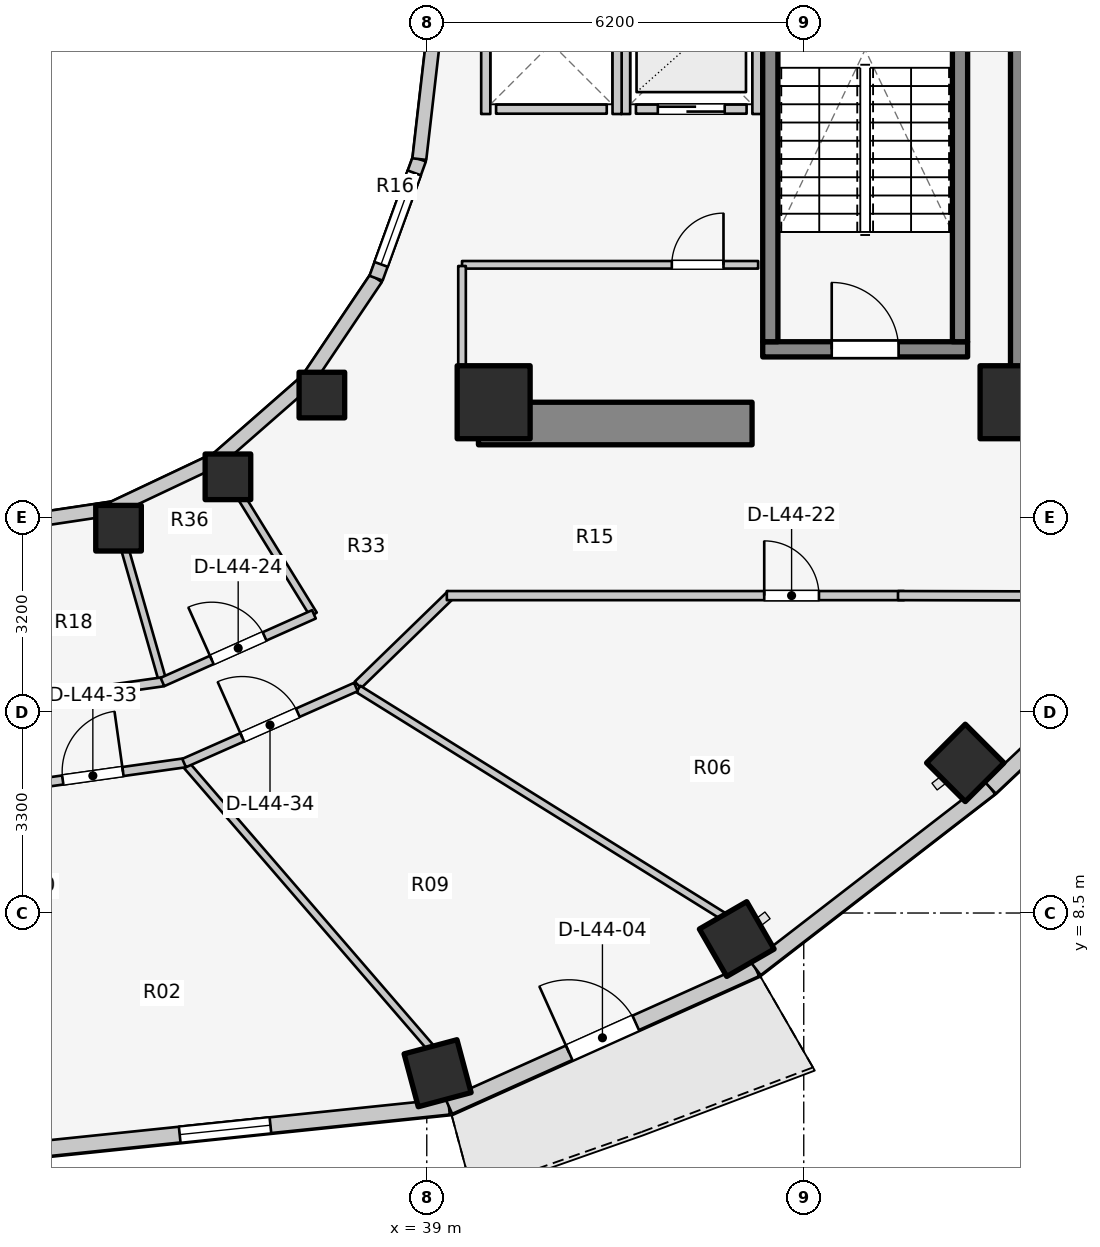
"""IFC4 building model, lengths in metres.
Left out: names, types, materials, properties, quantities, classifications, styles, units other than length and angle.
Written with IfcOpenShell. Run it as: python <this file> out.ifc"""

import sys

from ifc_helpers import new_model, si_unit, direction, frame, frame_2d, origin, origin_2d, place, context, subcontext, project, spatial, rectangle, extrude, element, fill, save


model = new_model("IFC4")
c1 = context("Model", 3, precision=1e-05, world=origin(), true_north=direction((0.0, 1.0)))
c2 = subcontext(c1, "Body", "Model", "MODEL_VIEW")
j1 = project(units=[si_unit("LENGTHUNIT", "METRE"), si_unit("PLANEANGLEUNIT", "RADIAN")], contexts=[c1])
p1 = place(None, origin())
s1 = spatial("IfcSite", under=j1, at=p1, CompositionType="ELEMENT")
p2 = place(p1, origin())
s2 = spatial("IfcBuilding", under=s1, at=p2, CompositionType="ELEMENT")
p3 = place(p2, frame((0.0, 0.0, 146.7)))
s3 = spatial("IfcBuildingStorey", under=s2, at=p3, CompositionType="ELEMENT", Elevation=146.7)
p4 = place(p3, frame((48.95, 17.05, 0.0), z_axis=(0.0, 0.0, 1.0), x_axis=(0.0, 1.0, 0.0)))
e1 = element("IfcWall", 1, at=p4, inside=s3, PredefinedType="SHEAR", context=c2, shape_type="SweptSolid", body=[
    extrude(rectangle(XDim=12.8, YDim=0.7, at=frame_2d((6.4, 0.0))), origin(), (0.0, 0.0, 1.0), 3.1),
])
p5 = place(p3, frame((39.85, 16.55, 0.0), z_axis=(0.0, 0.0, 1.0), x_axis=(1.0, 0.0, 0.0)))
e2 = element("IfcWall", 2, at=p5, inside=s3, PredefinedType="SHEAR", context=c2, shape_type="SweptSolid", body=[
    extrude(rectangle(XDim=4.5, YDim=0.7, at=frame_2d((2.25, 0.0))), origin(), (0.0, 0.0, 1.0), 3.1),
])
p6 = place(p3, frame((44.525, 17.77, 0.0), z_axis=(0.0, 0.0, 1.0), x_axis=(1.0, 0.0, 0.0)))
e3 = element("IfcWall", 3, at=p6, inside=s3, PredefinedType="SOLIDWALL", context=c2, shape_type="SweptSolid", body=[
    extrude(rectangle(XDim=3.37, YDim=0.25, at=frame_2d((1.685, 0.0))), origin(), (0.0, 0.0, 1.0), 3.1),
])
p7 = place(p6, frame((1.135, 0.0, 0.0)))
e4 = element("IfcOpeningElement", 4, at=p7, cuts=e3, PredefinedType="OPENING", context=c2, shape_type="SweptSolid", body=[
    extrude(rectangle(XDim=1.1, YDim=2.1, at=frame_2d((0.55, 1.05))), frame((0.0, 0.135, 0.0), z_axis=(0.0, -1.0, 0.0), x_axis=(1.0, 0.0, 0.0)), (0.0, 0.0, 1.0), 0.27),
])
for number, where, z_axis, x_axis in (
    (5, (44.65, 17.895, 0.0), (0.0, 0.0, 1.0), (0.0, 1.0, 0.0)),
    (6, (47.77, 17.895, 0.0), (0.0, 0.0, 1.0), (0.0, 1.0, 0.0)),
):
    element("IfcWall", number, at=place(p3, frame(where, z_axis=z_axis, x_axis=x_axis)), inside=s3, PredefinedType="SOLIDWALL", context=c2, shape_type="SweptSolid", body=[
        extrude(rectangle(XDim=7.81, YDim=0.25, at=frame_2d((3.905, 0.0))), origin(), (0.0, 0.0, 1.0), 3.1),
    ])
for number, where, z_axis, x_axis in (
    (7, (40.1, 16.9, 0.0), (0.0, 0.0, 1.0), (1.0, 0.0, 0.0)),
    (8, (48.7, 16.9, 0.0), (0.0, 0.0, 1.0), (1.0, 0.0, 0.0)),
):
    element("IfcColumn", number, at=place(p3, frame(where, z_axis=z_axis, x_axis=x_axis)), inside=s3, PredefinedType="COLUMN", context=c2, shape_type="SweptSolid", body=[
        extrude(rectangle(XDim=1.2, YDim=1.2, at=origin_2d()), origin(), (0.0, 0.0, 1.0), 3.1),
    ])
p8 = place(p3, frame((33.931, 14.828, 0.0), z_axis=(0.0, 0.0, 1.0), x_axis=(1.0, 0.0, 0.0)))
e9 = element("IfcColumn", 9, at=p8, inside=s3, PredefinedType="COLUMN", context=c2, shape_type="SweptSolid", body=[
    extrude(rectangle(XDim=0.75, YDim=0.75, at=origin_2d()), origin(), (0.0, 0.0, 1.0), 3.1),
])
p9 = place(p3, frame((39.178, 5.865, 0.0), z_axis=(0.0, 0.0, 1.0), x_axis=(0.258819045103, -0.965925826289, 0.0)))
e10 = element("IfcColumn", 10, at=p9, inside=s3, PredefinedType="COLUMN", context=c2, shape_type="SweptSolid", body=[
    extrude(rectangle(XDim=0.9, YDim=0.9, at=origin_2d()), origin(), (0.0, 0.0, 1.0), 3.1),
])
p10 = place(p3, frame((35.73, 15.673, 0.0), z_axis=(0.0, 0.0, 1.0), x_axis=(1.0, 0.0, 0.0)))
e11 = element("IfcColumn", 11, at=p10, inside=s3, PredefinedType="COLUMN", context=c2, shape_type="SweptSolid", body=[
    extrude(rectangle(XDim=0.75, YDim=0.75, at=origin_2d()), origin(), (0.0, 0.0, 1.0), 3.1),
])
p11 = place(p3, frame((44.098, 8.072, 0.0), z_axis=(0.0, 0.0, 1.0), x_axis=(0.5, -0.866025403784, 0.0)))
e12 = element("IfcColumn", 12, at=p11, inside=s3, PredefinedType="COLUMN", context=c2, shape_type="SweptSolid", body=[
    extrude(rectangle(XDim=0.9, YDim=0.9, at=origin_2d()), origin(), (0.0, 0.0, 1.0), 3.1),
])
p12 = place(p3, frame((37.275, 17.018, 0.0), z_axis=(0.0, 0.0, 1.0), x_axis=(1.0, 0.0, 0.0)))
e13 = element("IfcColumn", 13, at=p12, inside=s3, PredefinedType="COLUMN", context=c2, shape_type="SweptSolid", body=[
    extrude(rectangle(XDim=0.75, YDim=0.75, at=origin_2d()), origin(), (0.0, 0.0, 1.0), 3.1),
])
p13 = place(p3, frame((47.857, 10.969, 0.0), z_axis=(0.0, 0.0, 1.0), x_axis=(0.707106781187, -0.707106781187, 0.0)))
e14 = element("IfcColumn", 14, at=p13, inside=s3, PredefinedType="COLUMN", context=c2, shape_type="SweptSolid", body=[
    extrude(rectangle(XDim=0.9, YDim=0.9, at=origin_2d()), origin(), (0.0, 0.0, 1.0), 3.1),
])
p14 = place(p3, frame((32.0, 14.88, 0.0), z_axis=(0.0, 0.0, 1.0), x_axis=(0.988901730308, 0.148571086668, 0.0)))
e15 = element("IfcWall", 15, at=p14, inside=s3, PredefinedType="STANDARD", context=c2, shape_type="SweptSolid", body=[
    extrude(rectangle(XDim=1.864, YDim=0.23, at=frame_2d((0.932, 0.0))), origin(), (0.0, 0.0, 1.0), 2.16),
])
p15 = place(p3, frame((33.843, 15.157, 0.0), z_axis=(0.0, 0.0, 1.0), x_axis=(0.904179699603, 0.427152280606, 0.0)))
e16 = element("IfcWall", 16, at=p15, inside=s3, PredefinedType="STANDARD", context=c2, shape_type="SweptSolid", body=[
    extrude(rectangle(XDim=1.899, YDim=0.23, at=frame_2d((0.95, 0.0))), origin(), (0.0, 0.0, 1.0), 2.16),
])
p16 = place(p3, frame((35.56, 15.968, 0.0), z_axis=(0.0, 0.0, 1.0), x_axis=(0.752576694707, 0.658504607869, 0.0)))
e17 = element("IfcWall", 17, at=p16, inside=s3, PredefinedType="STANDARD", context=c2, shape_type="SweptSolid", body=[
    extrude(rectangle(XDim=1.959, YDim=0.23, at=frame_2d((0.98, 0.0))), origin(), (0.0, 0.0, 1.0), 2.16),
])
p17 = place(p3, frame((37.035, 17.258, 0.0), z_axis=(0.0, 0.0, 1.0), x_axis=(0.558197800898, 0.829707909492, 0.0)))
e18 = element("IfcWall", 18, at=p17, inside=s3, PredefinedType="STANDARD", context=c2, shape_type="SweptSolid", body=[
    extrude(rectangle(XDim=2.027, YDim=0.23, at=frame_2d((1.013, 0.0))), origin(), (0.0, 0.0, 1.0), 2.16),
])
p18 = place(p3, frame((38.166, 18.94, 0.0), z_axis=(0.0, 0.0, 1.0), x_axis=(0.341423187295, 0.93990968033, 0.0)))
e19 = element("IfcWall", 19, at=p18, inside=s3, PredefinedType="STANDARD", context=c2, shape_type="SweptSolid", body=[
    extrude(rectangle(XDim=2.084, YDim=0.23, at=frame_2d((1.042, 0.0))), origin(), (0.0, 0.0, 1.0), 2.84),
])
p19 = place(p18, frame((0.242, 0.0, 0.85)))
e20 = element("IfcOpeningElement", 20, at=p19, cuts=e19, PredefinedType="OPENING", context=c2, shape_type="SweptSolid", body=[
    extrude(rectangle(XDim=1.6, YDim=1.65, at=frame_2d((0.8, 0.825))), frame((0.0, 0.125, 0.0), z_axis=(0.0, -1.0, 0.0), x_axis=(1.0, 0.0, 0.0)), (0.0, 0.0, 1.0), 0.25),
])
p20 = place(p3, frame((38.877, 20.898, 0.0), z_axis=(0.0, 0.0, 1.0), x_axis=(0.114711713601, 0.993398823617, 0.0)))
e21 = element("IfcWall", 21, at=p20, inside=s3, PredefinedType="STANDARD", context=c2, shape_type="SweptSolid", body=[
    extrude(rectangle(XDim=2.115, YDim=0.23, at=frame_2d((1.058, 0.0))), origin(), (0.0, 0.0, 1.0), 2.84),
])
p21 = place(p3, frame((32.0, 4.552, 0.0), z_axis=(0.0, 0.0, 1.0), x_axis=(0.994664178965, 0.10316574569, 0.0)))
e22 = element("IfcWall", 22, at=p21, inside=s3, PredefinedType="STANDARD", context=c2, shape_type="SweptSolid", body=[
    extrude(rectangle(XDim=7.405, YDim=0.26, at=frame_2d((3.702, 0.0))), origin(), (0.0, 0.0, 1.0), 2.85),
])
p22 = place(p21, frame((2.952, 0.0, 0.75)))
e23 = element("IfcOpeningElement", 23, at=p22, cuts=e22, PredefinedType="OPENING", context=c2, shape_type="SweptSolid", body=[
    extrude(rectangle(XDim=1.5, YDim=1.6, at=frame_2d((0.75, 0.8))), frame((0.0, 0.14, 0.0), z_axis=(0.0, -1.0, 0.0), x_axis=(1.0, 0.0, 0.0)), (0.0, 0.0, 1.0), 0.28),
])
p23 = place(p3, frame((39.365, 5.315, 0.0), z_axis=(0.0, 0.0, 1.0), x_axis=(0.912353637112, 0.409403029847, 0.0)))
e24 = element("IfcWall", 24, at=p23, inside=s3, PredefinedType="STANDARD", context=c2, shape_type="SweptSolid", body=[
    extrude(rectangle(XDim=5.533, YDim=0.26, at=frame_2d((2.766, 0.0))), origin(), (0.0, 0.0, 1.0), 2.88),
])
p24 = place(p23, frame((2.167, 0.0, 0.0)))
e25 = element("IfcOpeningElement", 25, at=p24, cuts=e24, PredefinedType="OPENING", context=c2, shape_type="SweptSolid", body=[
    extrude(rectangle(XDim=1.2, YDim=2.2, at=frame_2d((0.6, 1.1))), frame((0.0, 0.14, 0.0), z_axis=(0.0, -1.0, 0.0), x_axis=(1.0, 0.0, 0.0)), (0.0, 0.0, 1.0), 0.28),
])
p25 = place(p3, frame((44.413, 7.581, 0.0), z_axis=(0.0, 0.0, 1.0), x_axis=(0.791460185804, 0.611220724687, 0.0)))
e26 = element("IfcWall", 26, at=p25, inside=s3, PredefinedType="STANDARD", context=c2, shape_type="SweptSolid", body=[
    extrude(rectangle(XDim=4.872, YDim=0.26, at=frame_2d((2.436, 0.0))), origin(), (0.0, 0.0, 1.0), 2.85),
])
p26 = place(p3, frame((48.269, 10.559, 0.0), z_axis=(0.0, 0.0, 1.0), x_axis=(0.727667301037, 0.68593024354, 0.0)))
e27 = element("IfcWall", 27, at=p26, inside=s3, PredefinedType="STANDARD", context=c2, shape_type="SweptSolid", body=[
    extrude(rectangle(XDim=4.604, YDim=0.26, at=frame_2d((2.302, 0.0))), origin(), (0.0, 0.0, 1.0), 2.85),
])
p27 = place(p26, frame((1.552, 0.0, 0.75)))
e28 = element("IfcOpeningElement", 28, at=p27, cuts=e27, PredefinedType="OPENING", context=c2, shape_type="SweptSolid", body=[
    extrude(rectangle(XDim=1.5, YDim=1.6, at=frame_2d((0.75, 0.8))), frame((0.0, 0.14, 0.0), z_axis=(0.0, -1.0, 0.0), x_axis=(1.0, 0.0, 0.0)), (0.0, 0.0, 1.0), 0.28),
])
p28 = place(p3, frame((42.44, 21.72, 0.0), z_axis=(0.0, 0.0, 1.0), x_axis=(1.0, 0.0, 0.0)))
e29 = element("IfcWall", 29, at=p28, inside=s3, PredefinedType="SOLIDWALL", context=c2, shape_type="SweptSolid", body=[
    extrude(rectangle(XDim=1.82, YDim=0.15, at=frame_2d((0.91, 0.0))), origin(), (0.0, 0.0, 1.0), 2.855),
])
p29 = place(p28, frame((0.36, 0.0, 0.0)))
e30 = element("IfcOpeningElement", 30, at=p29, cuts=e29, PredefinedType="OPENING", context=c2, shape_type="SweptSolid", body=[
    extrude(rectangle(XDim=1.1, YDim=2.1, at=frame_2d((0.55, 1.05))), frame((0.0, 0.085, 0.0), z_axis=(0.0, -1.0, 0.0), x_axis=(1.0, 0.0, 0.0)), (0.0, 0.0, 1.0), 0.17),
])
for number, where, z_axis, x_axis in (
    (31, (42.27, 21.64, 0.0), (0.0, 0.0, 1.0), (0.0, 1.0, 0.0)),
    (32, (44.43, 21.64, 0.0), (0.0, 0.0, 1.0), (0.0, 1.0, 0.0)),
):
    element("IfcWall", number, at=place(p3, frame(where, z_axis=z_axis, x_axis=x_axis)), inside=s3, PredefinedType="SOLIDWALL", context=c2, shape_type="SweptSolid", body=[
        extrude(rectangle(XDim=2.32, YDim=0.15, at=frame_2d((1.16, 0.0))), origin(), (0.0, 0.0, 1.0), 2.855),
    ])
p30 = place(p3, frame((40.14, 21.72, 0.0), z_axis=(0.0, 0.0, 1.0), x_axis=(1.0, 0.0, 0.0)))
e33 = element("IfcWall", 33, at=p30, inside=s3, PredefinedType="SOLIDWALL", context=c2, shape_type="SweptSolid", body=[
    extrude(rectangle(XDim=1.82, YDim=0.15, at=frame_2d((0.91, 0.0))), origin(), (0.0, 0.0, 1.0), 2.12),
])
p31 = place(p3, frame((39.97, 21.64, 0.0), z_axis=(0.0, 0.0, 1.0), x_axis=(0.0, 1.0, 0.0)))
e34 = element("IfcWall", 34, at=p31, inside=s3, PredefinedType="SOLIDWALL", context=c2, shape_type="SweptSolid", body=[
    extrude(rectangle(XDim=2.32, YDim=0.15, at=frame_2d((1.16, 0.0))), origin(), (0.0, 0.0, 1.0), 2.12),
])
p32 = place(p3, frame((42.13, 21.64, 0.0), z_axis=(0.0, 0.0, 1.0), x_axis=(0.0, 1.0, 0.0)))
e35 = element("IfcWall", 35, at=p32, inside=s3, PredefinedType="SOLIDWALL", context=c2, shape_type="SweptSolid", body=[
    extrude(rectangle(XDim=2.32, YDim=0.15, at=frame_2d((1.16, 0.0))), origin(), (0.0, 0.0, 1.0), 2.855),
])
p33 = place(p3, frame((39.58, 19.16, 0.0), z_axis=(0.0, 0.0, 1.0), x_axis=(1.0, 0.0, 0.0)))
e36 = element("IfcWall", 36, at=p33, inside=s3, PredefinedType="PARTITIONING", context=c2, shape_type="SweptSolid", body=[
    extrude(rectangle(XDim=4.87, YDim=0.125, at=frame_2d((2.435, 0.0))), origin(), (0.0, 0.0, 1.0), 2.12),
])
p34 = place(p33, frame((3.45, 0.0, 0.0)))
e37 = element("IfcOpeningElement", 37, at=p34, cuts=e36, PredefinedType="OPENING", context=c2, shape_type="SweptSolid", body=[
    extrude(rectangle(XDim=0.85, YDim=2.05, at=frame_2d((0.425, 1.025))), frame((0.0, 0.073, 0.0), z_axis=(0.0, -1.0, 0.0), x_axis=(1.0, 0.0, 0.0)), (0.0, 0.0, 1.0), 0.145),
])
p35 = place(p3, frame((39.58, 17.1, 0.0), z_axis=(0.0, 0.0, 1.0), x_axis=(0.0, 1.0, 0.0)))
e38 = element("IfcWall", 38, at=p35, inside=s3, PredefinedType="PARTITIONING", context=c2, shape_type="SweptSolid", body=[
    extrude(rectangle(XDim=2.04, YDim=0.125, at=frame_2d((1.02, 0.0))), origin(), (0.0, 0.0, 1.0), 2.232),
])
p36 = place(p3, frame((37.867, 12.251, 0.0), z_axis=(0.0, 0.0, 1.0), x_axis=(0.717419568599, 0.696641344302, 0.0)))
e39 = element("IfcWall", 39, at=p36, inside=s3, PredefinedType="PARTITIONING", context=c2, shape_type="SweptSolid", body=[
    extrude(rectangle(XDim=2.138, YDim=0.15, at=frame_2d((1.069, 0.0))), origin(), (0.0, 0.0, 1.0), 2.299),
])
p37 = place(p3, frame((39.33, 13.72, 0.0), z_axis=(0.0, 0.0, 1.0), x_axis=(1.0, 0.0, 0.0)))
e40 = element("IfcWall", 40, at=p37, inside=s3, PredefinedType="PARTITIONING", context=c2, shape_type="SweptSolid", body=[
    extrude(rectangle(XDim=7.52, YDim=0.15, at=frame_2d((3.76, 0.0))), origin(), (0.0, 0.0, 1.0), 2.299),
])
p38 = place(p37, frame((5.22, 0.0, 0.0)))
e41 = element("IfcOpeningElement", 41, at=p38, cuts=e40, PredefinedType="OPENING", context=c2, shape_type="SweptSolid", body=[
    extrude(rectangle(XDim=0.9, YDim=2.1, at=frame_2d((0.45, 1.05))), frame((0.0, 0.085, 0.0), z_axis=(0.0, -1.0, 0.0), x_axis=(1.0, 0.0, 0.0)), (0.0, 0.0, 1.0), 0.17),
])
p39 = place(p3, frame((46.75, 13.72, 0.0), z_axis=(0.0, 0.0, 1.0), x_axis=(0.999997122315, -0.00239903348, 0.0)))
e42 = element("IfcWall", 42, at=p39, inside=s3, PredefinedType="PARTITIONING", context=c2, shape_type="SweptSolid", body=[
    extrude(rectangle(XDim=4.885, YDim=0.15, at=frame_2d((2.442, 0.0))), origin(), (0.0, 0.0, 1.0), 2.22),
])
p40 = place(p3, frame((33.838, 15.176, 0.0), z_axis=(0.0, 0.0, 1.0), x_axis=(0.274947609893, -0.961459209647, 0.0)))
e43 = element("IfcWall", 43, at=p40, inside=s3, PredefinedType="PARTITIONING", context=c2, shape_type="SweptSolid", body=[
    extrude(rectangle(XDim=2.99, YDim=0.125, at=frame_2d((1.495, 0.0))), origin(), (0.0, 0.0, 1.0), 2.299),
])
p41 = place(p3, frame((35.55, 15.985, 0.0), z_axis=(0.0, 0.0, 1.0), x_axis=(0.524565340045, -0.851370192116, 0.0)))
e44 = element("IfcWall", 44, at=p41, inside=s3, PredefinedType="PARTITIONING", context=c2, shape_type="SweptSolid", body=[
    extrude(rectangle(XDim=3.027, YDim=0.125, at=frame_2d((1.514, 0.0))), origin(), (0.0, 0.0, 1.0), 2.299),
])
p42 = place(p3, frame((31.998, 11.924, 0.0), z_axis=(0.0, 0.0, 1.0), x_axis=(0.990041682628, 0.140774524184, 0.0)))
e45 = element("IfcWall", 45, at=p42, inside=s3, PredefinedType="PARTITIONING", context=c2, shape_type="SweptSolid", body=[
    extrude(rectangle(XDim=2.695, YDim=0.15, at=frame_2d((1.348, 0.0))), origin(), (0.0, 0.0, 1.0), 2.299),
])
p43 = place(p3, frame((34.653, 12.299, 0.0), z_axis=(0.0, 0.0, 1.0), x_axis=(0.913112902883, 0.407706789971, 0.0)))
e46 = element("IfcWall", 46, at=p43, inside=s3, PredefinedType="PARTITIONING", context=c2, shape_type="SweptSolid", body=[
    extrude(rectangle(XDim=2.729, YDim=0.15, at=frame_2d((1.364, 0.0))), origin(), (0.0, 0.0, 1.0), 2.299),
])
p44 = place(p43, frame((0.889, 0.0, 0.0)))
e47 = element("IfcOpeningElement", 47, at=p44, cuts=e46, PredefinedType="OPENING", context=c2, shape_type="SweptSolid", body=[
    extrude(rectangle(XDim=0.95, YDim=2.1, at=frame_2d((0.475, 1.05))), frame((0.0, 0.085, 0.0), z_axis=(0.0, -1.0, 0.0), x_axis=(1.0, 0.0, 0.0)), (0.0, 0.0, 1.0), 0.17),
])
p45 = place(p3, frame((35.053, 10.927, 0.0), z_axis=(0.0, 0.0, 1.0), x_axis=(0.653779283332, -0.756685303601, 0.0)))
e48 = element("IfcWall", 48, at=p45, inside=s3, PredefinedType="PARTITIONING", context=c2, shape_type="SweptSolid", body=[
    extrude(rectangle(XDim=6.14, YDim=0.125, at=frame_2d((3.07, 0.0))), origin(), (0.0, 0.0, 1.0), 2.299),
])
p46 = place(p3, frame((37.875, 12.184, 0.0), z_axis=(0.0, 0.0, 1.0), x_axis=(0.849008457073, -0.528379257559, 0.0)))
e49 = element("IfcWall", 49, at=p46, inside=s3, PredefinedType="PARTITIONING", context=c2, shape_type="SweptSolid", body=[
    extrude(rectangle(XDim=7.077, YDim=0.125, at=frame_2d((3.539, 0.0))), origin(), (0.0, 0.0, 1.0), 2.299),
])
p47 = place(p3, frame((31.992, 10.544, 0.0), z_axis=(0.0, 0.0, 1.0), x_axis=(0.990243864279, 0.139345216129, 0.0)))
e50 = element("IfcWall", 50, at=p47, inside=s3, PredefinedType="PARTITIONING", context=c2, shape_type="SweptSolid", body=[
    extrude(rectangle(XDim=3.062, YDim=0.15, at=frame_2d((1.531, 0.0))), origin(), (0.0, 0.0, 1.0), 2.299),
])
p48 = place(p47, frame((1.031, 0.0, 0.0)))
e51 = element("IfcOpeningElement", 51, at=p48, cuts=e50, PredefinedType="OPENING", context=c2, shape_type="SweptSolid", body=[
    extrude(rectangle(XDim=1.0, YDim=2.1, at=frame_2d((0.5, 1.05))), frame((0.0, 0.085, 0.0), z_axis=(0.0, -1.0, 0.0), x_axis=(1.0, 0.0, 0.0)), (0.0, 0.0, 1.0), 0.17),
])
p49 = place(p3, frame((35.009, 10.966, 0.0), z_axis=(0.0, 0.0, 1.0), x_axis=(0.91445214467, 0.404694051239, 0.0)))
e52 = element("IfcWall", 52, at=p49, inside=s3, PredefinedType="PARTITIONING", context=c2, shape_type="SweptSolid", body=[
    extrude(rectangle(XDim=3.091, YDim=0.15, at=frame_2d((1.545, 0.0))), origin(), (0.0, 0.0, 1.0), 2.299),
])
p50 = place(p49, frame((1.045, 0.0, 0.0)))
e53 = element("IfcOpeningElement", 53, at=p50, cuts=e52, PredefinedType="OPENING", context=c2, shape_type="SweptSolid", body=[
    extrude(rectangle(XDim=1.0, YDim=2.1, at=frame_2d((0.5, 1.05))), frame((0.0, 0.085, 0.0), z_axis=(0.0, -1.0, 0.0), x_axis=(1.0, 0.0, 0.0)), (0.0, 0.0, 1.0), 0.17),
])
p51 = place(p19, origin())
e54 = element("IfcWindow", 54, at=p51, inside=s3, PartitioningType="SINGLE_PANEL", PredefinedType="WINDOW", context=c2, shape_type="SweptSolid", body=[
    extrude(rectangle(XDim=1.6, YDim=1.65, at=frame_2d((0.8, 0.825))), frame((0.0, 0.03, 0.0), z_axis=(0.0, -1.0, 0.0), x_axis=(1.0, 0.0, 0.0)), (0.0, 0.0, 1.0), 0.06),
])
fill(e20, e54)
p52 = place(p22, origin())
e55 = element("IfcWindow", 55, at=p52, inside=s3, PartitioningType="SINGLE_PANEL", PredefinedType="WINDOW", context=c2, shape_type="SweptSolid", body=[
    extrude(rectangle(XDim=1.5, YDim=1.6, at=frame_2d((0.75, 0.8))), frame((0.0, 0.03, 0.0), z_axis=(0.0, -1.0, 0.0), x_axis=(1.0, 0.0, 0.0)), (0.0, 0.0, 1.0), 0.06),
])
fill(e23, e55)
p53 = place(p24, origin())
e56 = element("IfcDoor", 56, at=p53, inside=s3, OperationType="SINGLE_SWING_LEFT", PredefinedType="DOOR", context=c2, shape_type="SweptSolid", body=[
    extrude(rectangle(XDim=1.2, YDim=2.2, at=frame_2d((0.6, 1.1))), frame((0.0, 0.025, 0.0), z_axis=(0.0, -1.0, 0.0), x_axis=(1.0, 0.0, 0.0)), (0.0, 0.0, 1.0), 0.05),
])
fill(e25, e56)
p54 = place(p7, origin())
e57 = element("IfcDoor", 57, at=p54, inside=s3, OperationType="SINGLE_SWING_LEFT", PredefinedType="DOOR", context=c2, shape_type="SweptSolid", body=[
    extrude(rectangle(XDim=1.1, YDim=2.1, at=frame_2d((0.55, 1.05))), frame((0.0, 0.025, 0.0), z_axis=(0.0, -1.0, 0.0), x_axis=(1.0, 0.0, 0.0)), (0.0, 0.0, 1.0), 0.05),
])
fill(e4, e57)
p55 = place(p29, origin())
e58 = element("IfcDoor", 58, at=p55, inside=s3, OperationType="DOUBLE_DOOR_SLIDING", PredefinedType="DOOR", context=c2, shape_type="SweptSolid", body=[
    extrude(rectangle(XDim=1.1, YDim=2.1, at=frame_2d((0.55, 1.05))), frame((0.0, 0.025, 0.0), z_axis=(0.0, -1.0, 0.0), x_axis=(1.0, 0.0, 0.0)), (0.0, 0.0, 1.0), 0.05),
])
fill(e30, e58)
p56 = place(p34, origin())
e59 = element("IfcDoor", 59, at=p56, inside=s3, OperationType="SINGLE_SWING_RIGHT", PredefinedType="DOOR", context=c2, shape_type="SweptSolid", body=[
    extrude(rectangle(XDim=0.85, YDim=2.05, at=frame_2d((0.425, 1.025))), frame((0.0, 0.025, 0.0), z_axis=(0.0, -1.0, 0.0), x_axis=(1.0, 0.0, 0.0)), (0.0, 0.0, 1.0), 0.05),
])
fill(e37, e59)
p57 = place(p38, origin())
e60 = element("IfcDoor", 60, at=p57, inside=s3, OperationType="SINGLE_SWING_LEFT", PredefinedType="DOOR", context=c2, shape_type="SweptSolid", body=[
    extrude(rectangle(XDim=0.9, YDim=2.1, at=frame_2d((0.45, 1.05))), frame((0.0, 0.025, 0.0), z_axis=(0.0, -1.0, 0.0), x_axis=(1.0, 0.0, 0.0)), (0.0, 0.0, 1.0), 0.05),
])
fill(e41, e60)
p58 = place(p44, origin())
e61 = element("IfcDoor", 61, at=p58, inside=s3, OperationType="SINGLE_SWING_LEFT", PredefinedType="DOOR", context=c2, shape_type="SweptSolid", body=[
    extrude(rectangle(XDim=0.95, YDim=2.1, at=frame_2d((0.475, 1.05))), frame((0.0, 0.025, 0.0), z_axis=(0.0, -1.0, 0.0), x_axis=(1.0, 0.0, 0.0)), (0.0, 0.0, 1.0), 0.05),
])
fill(e47, e61)
p59 = place(p48, origin())
e62 = element("IfcDoor", 62, at=p59, inside=s3, OperationType="SINGLE_SWING_RIGHT", PredefinedType="DOOR", context=c2, shape_type="SweptSolid", body=[
    extrude(rectangle(XDim=1.0, YDim=2.1, at=frame_2d((0.5, 1.05))), frame((0.0, 0.025, 0.0), z_axis=(0.0, -1.0, 0.0), x_axis=(1.0, 0.0, 0.0)), (0.0, 0.0, 1.0), 0.05),
])
fill(e51, e62)
p60 = place(p50, origin())
e63 = element("IfcDoor", 63, at=p60, inside=s3, OperationType="SINGLE_SWING_LEFT", PredefinedType="DOOR", context=c2, shape_type="SweptSolid", body=[
    extrude(rectangle(XDim=1.0, YDim=2.1, at=frame_2d((0.5, 1.05))), frame((0.0, 0.025, 0.0), z_axis=(0.0, -1.0, 0.0), x_axis=(1.0, 0.0, 0.0)), (0.0, 0.0, 1.0), 0.05),
])
fill(e53, e63)
save(model, sys.argv[1])
